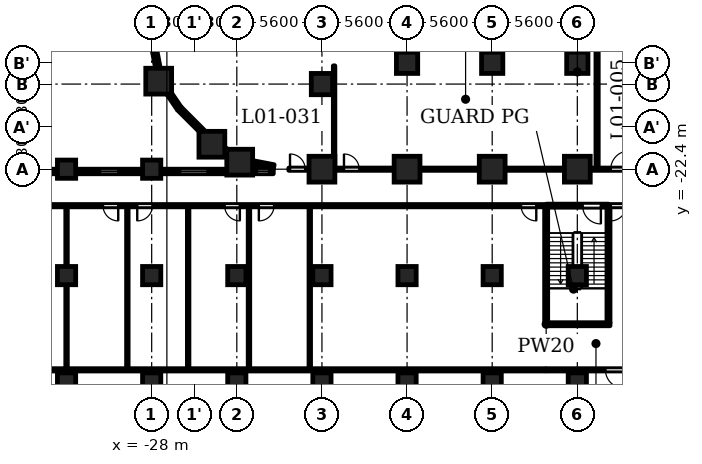
"""IFC4 building model, lengths in metres.
Left out: names, types, materials, properties, quantities, classifications, styles, units other than length and angle.
Written with IfcOpenShell. Run it as: python <this file> out.ifc"""

import sys

from ifc_helpers import new_model, si_unit, direction, frame, frame_2d, origin, origin_2d, place, context, subcontext, project, spatial, polyline, rectangle, circle, outline, extrude, element, fill, save


model = new_model("IFC4")
c1 = context("Model", 3, precision=1e-05, world=origin(), true_north=direction((0.0, 1.0)))
c2 = subcontext(c1, "Body", "Model", "MODEL_VIEW")
j1 = project(units=[si_unit("LENGTHUNIT", "METRE"), si_unit("PLANEANGLEUNIT", "RADIAN")], contexts=[c1])
p1 = place(None, origin())
s1 = spatial("IfcSite", under=j1, at=p1, CompositionType="ELEMENT")
p2 = place(p1, origin())
s2 = spatial("IfcBuilding", under=s1, at=p2, CompositionType="ELEMENT")
p3 = place(p2, frame((0.0, 0.0, 6.5)))
s3 = spatial("IfcBuildingStorey", under=s2, at=p3, CompositionType="ELEMENT", Elevation=6.5)
for number, where, z_axis, x_axis in (
    (1, (-22.209, -21.938, 0.0), (0.0, 0.0, 1.0), (1.0, 0.0, 0.0)),
    (2, (-16.8, -22.4, 0.0), (0.0, 0.0, 1.0), (1.0, 0.0, 0.0)),
    (3, (-11.2, -22.4, 0.0), (0.0, 0.0, 1.0), (1.0, 0.0, 0.0)),
    (4, (-5.6, -22.4, 0.0), (0.0, 0.0, 1.0), (1.0, 0.0, 0.0)),
    (5, (0.0, -22.4, 0.0), (0.0, 0.0, 1.0), (1.0, 0.0, 0.0)),
    (6, (-27.538, -16.609, 0.0), (0.0, 0.0, 1.0), (1.0, 0.0, 0.0)),
    (7, (-24.04, -20.76, 0.0), (0.0, 0.0, 1.0), (1.0, 0.0, 0.0)),
):
    element("IfcColumn", number, at=place(p3, frame(where, z_axis=z_axis, x_axis=x_axis)), inside=s3, PredefinedType="COLUMN", context=c2, shape_type="SweptSolid", body=[
        extrude(rectangle(XDim=1.7, YDim=1.7, at=origin_2d()), origin(), (0.0, 0.0, 1.0), 4.8),
    ])
for number, where, z_axis, x_axis in (
    (8, (-16.8, -16.8, 0.0), (0.0, 0.0, 1.0), (1.0, 0.0, 0.0)),
    (9, (-11.2, -15.4, 0.0), (0.0, 0.0, 1.0), (1.0, 0.0, 0.0)),
    (10, (-5.6, -15.4, 0.0), (0.0, 0.0, 1.0), (1.0, 0.0, 0.0)),
    (11, (0.0, -15.4, 0.0), (0.0, 0.0, 1.0), (1.0, 0.0, 0.0)),
):
    element("IfcColumn", number, at=place(p3, frame(where, z_axis=z_axis, x_axis=x_axis)), inside=s3, PredefinedType="COLUMN", context=c2, shape_type="SweptSolid", body=[
        extrude(rectangle(XDim=1.4, YDim=1.4, at=origin_2d()), origin(), (0.0, 0.0, 1.0), 4.8),
    ])
for number, where, z_axis, x_axis in (
    (12, (-33.6, -29.4, 0.0), (0.0, 0.0, 1.0), (1.0, 0.0, 0.0)),
    (13, (-28.0, -29.4, 0.0), (0.0, 0.0, 1.0), (1.0, 0.0, 0.0)),
    (14, (-22.4, -29.4, 0.0), (0.0, 0.0, 1.0), (1.0, 0.0, 0.0)),
    (15, (-16.8, -29.4, 0.0), (0.0, 0.0, 1.0), (1.0, 0.0, 0.0)),
    (16, (-11.2, -29.4, 0.0), (0.0, 0.0, 1.0), (1.0, 0.0, 0.0)),
    (17, (-5.6, -29.4, 0.0), (0.0, 0.0, 1.0), (1.0, 0.0, 0.0)),
    (18, (0.0, -29.4, 0.0), (0.0, 0.0, 1.0), (1.0, 0.0, 0.0)),
    (19, (-33.6, -36.4, 0.0), (0.0, 0.0, 1.0), (1.0, 0.0, 0.0)),
    (20, (-28.0, -36.4, 0.0), (0.0, 0.0, 1.0), (1.0, 0.0, 0.0)),
    (21, (-22.4, -36.4, 0.0), (0.0, 0.0, 1.0), (1.0, 0.0, 0.0)),
    (22, (-16.8, -36.4, 0.0), (0.0, 0.0, 1.0), (1.0, 0.0, 0.0)),
    (23, (-11.2, -36.4, 0.0), (0.0, 0.0, 1.0), (1.0, 0.0, 0.0)),
    (24, (-5.6, -36.4, 0.0), (0.0, 0.0, 1.0), (1.0, 0.0, 0.0)),
    (25, (0.0, -36.4, 0.0), (0.0, 0.0, 1.0), (1.0, 0.0, 0.0)),
    (26, (-33.6, -22.4, 0.0), (0.0, 0.0, 1.0), (1.0, 0.0, 0.0)),
    (27, (-28.0, -22.4, 0.0), (0.0, 0.0, 1.0), (1.0, 0.0, 0.0)),
):
    element("IfcColumn", number, at=place(p3, frame(where, z_axis=z_axis, x_axis=x_axis)), inside=s3, PredefinedType="COLUMN", context=c2, shape_type="SweptSolid", body=[
        extrude(circle(Radius=0.6, at=origin_2d()), origin(), (0.0, 0.0, 1.0), 4.8),
    ])
for number, where, z_axis, x_axis in (
    (28, (-27.853, -14.372, 0.0), (0.0, 0.0, 1.0), (0.187, -0.982, 0.0)),
    (29, (-26.969, -17.25, 0.0), (0.0, 0.0, 1.0), (0.562, -0.827, 0.0)),
):
    element("IfcWall", number, at=place(p3, frame(where, z_axis=z_axis, x_axis=x_axis)), inside=s3, PredefinedType="SOLIDWALL", context=c2, shape_type="SweptSolid", body=[
        extrude(rectangle(XDim=1.406, YDim=0.3, at=frame_2d((0.703, 0.0))), origin(), (0.0, 0.0, 1.0), 3.55),
    ])
p4 = place(p3, frame((-26.197, -18.391, 0.0), z_axis=(0.0, 0.0, 1.0), x_axis=(0.707054835785, -0.707158722772, 0.0)))
e30 = element("IfcWall", 30, at=p4, inside=s3, PredefinedType="SOLIDWALL", context=c2, shape_type="SweptSolid", body=[
    extrude(rectangle(XDim=2.35, YDim=0.3, at=frame_2d((1.175, 0.0))), origin(), (0.0, 0.0, 1.0), 3.55),
])
p5 = place(p3, frame((-23.244, -21.101, 0.0), z_axis=(0.0, 0.0, 1.0), x_axis=(0.827135885329, -0.562001981492, 0.0)))
e31 = element("IfcWall", 31, at=p5, inside=s3, PredefinedType="SOLIDWALL", context=c2, shape_type="SweptSolid", body=[
    extrude(rectangle(XDim=0.477, YDim=0.3, at=frame_2d((0.239, 0.0))), origin(), (0.0, 0.0, 1.0), 4.45),
])
p6 = place(p3, frame((-21.353, -21.989, 0.0), z_axis=(0.0, 0.0, 1.0), x_axis=(0.98229142023, -0.187359455971, 0.0)))
e32 = element("IfcWall", 32, at=p6, inside=s3, PredefinedType="SOLIDWALL", context=c2, shape_type="SweptSolid", body=[
    extrude(rectangle(XDim=1.406, YDim=0.3, at=frame_2d((0.703, 0.0))), origin(), (0.0, 0.0, 1.0), 3.55),
])
p7 = place(p3, frame((-20.0, -22.55, 0.0), z_axis=(0.0, 0.0, 1.0), x_axis=(-1.0, 0.0, 0.0)))
e33 = element("IfcWall", 33, at=p7, inside=s3, PredefinedType="SOLIDWALL", context=c2, shape_type="SweptSolid", body=[
    extrude(rectangle(XDim=1.359, YDim=0.3, at=frame_2d((0.679, 0.0))), origin(), (0.0, 0.0, 1.0), 3.55),
])
p8 = place(p7, frame((0.279, 0.0, 0.6)))
e34 = element("IfcOpeningElement", 34, at=p8, cuts=e33, PredefinedType="OPENING", context=c2, shape_type="SweptSolid", body=[
    extrude(rectangle(XDim=0.8, YDim=1.55, at=frame_2d((0.4, 0.775))), frame((0.0, 0.16, 0.0), z_axis=(0.0, -1.0, 0.0), x_axis=(1.0, 0.0, 0.0)), (0.0, 0.0, 1.0), 0.32),
])
p9 = place(p3, frame((-23.059, -22.55, 0.0), z_axis=(0.0, 0.0, 1.0), x_axis=(-1.0, 0.0, 0.0)))
e35 = element("IfcWall", 35, at=p9, inside=s3, PredefinedType="SOLIDWALL", context=c2, shape_type="SweptSolid", body=[
    extrude(rectangle(XDim=4.341, YDim=0.3, at=frame_2d((2.171, 0.0))), origin(), (0.0, 0.0, 1.0), 4.45),
])
p10 = place(p9, frame((1.271, 0.0, 0.9)))
e36 = element("IfcOpeningElement", 36, at=p10, cuts=e35, PredefinedType="OPENING", context=c2, shape_type="SweptSolid", body=[
    extrude(rectangle(XDim=1.8, YDim=1.25, at=frame_2d((0.9, 0.625))), frame((0.0, 0.16, 0.0), z_axis=(0.0, -1.0, 0.0), x_axis=(1.0, 0.0, 0.0)), (0.0, 0.0, 1.0), 0.32),
])
p11 = place(p3, frame((-28.6, -22.55, 0.0), z_axis=(0.0, 0.0, 1.0), x_axis=(-1.0, 0.0, 0.0)))
e37 = element("IfcWall", 37, at=p11, inside=s3, PredefinedType="SOLIDWALL", context=c2, shape_type="SweptSolid", body=[
    extrude(rectangle(XDim=4.4, YDim=0.3, at=frame_2d((2.2, 0.0))), origin(), (0.0, 0.0, 1.0), 4.45),
])
p12 = place(p11, frame((1.6, 0.0, 0.6)))
e38 = element("IfcOpeningElement", 38, at=p12, cuts=e37, PredefinedType="OPENING", context=c2, shape_type="SweptSolid", body=[
    extrude(rectangle(XDim=1.2, YDim=1.55, at=frame_2d((0.6, 0.775))), frame((0.0, 0.16, 0.0), z_axis=(0.0, -1.0, 0.0), x_axis=(1.0, 0.0, 0.0)), (0.0, 0.0, 1.0), 0.32),
])
p13 = place(p3, frame((-34.2, -22.55, 0.0), z_axis=(0.0, 0.0, 1.0), x_axis=(-1.0, 0.0, 0.0)))
e39 = element("IfcWall", 39, at=p13, inside=s3, PredefinedType="SOLIDWALL", context=c2, shape_type="SweptSolid", body=[
    extrude(rectangle(XDim=4.4, YDim=0.3, at=frame_2d((2.2, 0.0))), origin(), (0.0, 0.0, 1.0), 4.45),
])
p14 = place(p13, frame((1.3, 0.0, 0.9)))
e40 = element("IfcOpeningElement", 40, at=p14, cuts=e39, PredefinedType="OPENING", context=c2, shape_type="SweptSolid", body=[
    extrude(rectangle(XDim=1.8, YDim=1.25, at=frame_2d((0.9, 0.625))), frame((0.0, 0.16, 0.0), z_axis=(0.0, -1.0, 0.0), x_axis=(1.0, 0.0, 0.0)), (0.0, 0.0, 1.0), 0.32),
])
p15 = place(p3, frame((-44.48, -35.6, 0.0), z_axis=(0.0, 0.0, 1.0), x_axis=(1.0, 0.0, 0.0)))
e41 = element("IfcWall", 41, at=p15, inside=s3, PredefinedType="PARTITIONING", context=c2, shape_type="SweptSolid", body=[
    extrude(rectangle(XDim=42.38, YDim=0.15, at=frame_2d((21.19, 0.0))), origin(), (0.0, 0.0, 1.0), 4.45),
])
p16 = place(p3, frame((-2.05, -35.6, 0.0), z_axis=(0.0, 0.0, 1.0), x_axis=(1.0, 0.0, 0.0)))
e42 = element("IfcWall", 42, at=p16, inside=s3, PredefinedType="PARTITIONING", context=c2, shape_type="SweptSolid", body=[
    extrude(rectangle(XDim=5.6, YDim=0.15, at=frame_2d((2.8, 0.0))), origin(), (0.0, 0.0, 1.0), 4.45),
])
p17 = place(p16, frame((3.9, 0.0, 0.0)))
e43 = element("IfcOpeningElement", 43, at=p17, cuts=e42, PredefinedType="OPENING", context=c2, shape_type="SweptSolid", body=[
    extrude(rectangle(XDim=1.2, YDim=2.1, at=frame_2d((0.6, 1.05))), frame((0.0, 0.085, 0.0), z_axis=(0.0, -1.0, 0.0), x_axis=(1.0, 0.0, 0.0)), (0.0, 0.0, 1.0), 0.17),
])
p18 = place(p3, frame((-2.05, -32.6, 0.0), z_axis=(0.0, 0.0, 1.0), x_axis=(1.0, 0.0, 0.0)))
e44 = element("IfcWall", 44, at=p18, inside=s3, PredefinedType="SHEAR", context=c2, shape_type="SweptSolid", body=[
    extrude(rectangle(XDim=4.2, YDim=0.2, at=frame_2d((2.1, 0.0))), origin(), (0.0, 0.0, 1.0), 4.45),
])
p19 = place(p3, frame((-37.0, -24.8, 0.0), z_axis=(0.0, 0.0, 1.0), x_axis=(1.0, 0.0, 0.0)))
e45 = element("IfcWall", 45, at=p19, inside=s3, PredefinedType="PARTITIONING", context=c2, shape_type="SweptSolid", body=[
    extrude(rectangle(XDim=34.9, YDim=0.15, at=frame_2d((17.45, 0.0))), origin(), (0.0, 0.0, 1.0), 4.45),
])
p20 = place(p19, frame((0.65, 0.0, 0.0)))
e46 = element("IfcOpeningElement", 46, at=p20, cuts=e45, PredefinedType="OPENING", context=c2, shape_type="SweptSolid", body=[
    extrude(rectangle(XDim=1.0, YDim=2.1, at=frame_2d((0.5, 1.05))), frame((0.0, 0.085, 0.0), z_axis=(0.0, -1.0, 0.0), x_axis=(1.0, 0.0, 0.0)), (0.0, 0.0, 1.0), 0.17),
])
p21 = place(p19, frame((5.8, 0.0, 0.0)))
e47 = element("IfcOpeningElement", 47, at=p21, cuts=e45, PredefinedType="OPENING", context=c2, shape_type="SweptSolid", body=[
    extrude(rectangle(XDim=1.0, YDim=2.1, at=frame_2d((0.5, 1.05))), frame((0.0, 0.085, 0.0), z_axis=(0.0, -1.0, 0.0), x_axis=(1.0, 0.0, 0.0)), (0.0, 0.0, 1.0), 0.17),
])
p22 = place(p19, frame((8.05, 0.0, 0.0)))
e48 = element("IfcOpeningElement", 48, at=p22, cuts=e45, PredefinedType="OPENING", context=c2, shape_type="SweptSolid", body=[
    extrude(rectangle(XDim=1.0, YDim=2.1, at=frame_2d((0.5, 1.05))), frame((0.0, 0.085, 0.0), z_axis=(0.0, -1.0, 0.0), x_axis=(1.0, 0.0, 0.0)), (0.0, 0.0, 1.0), 0.17),
])
p23 = place(p19, frame((13.8, 0.0, 0.0)))
e49 = element("IfcOpeningElement", 49, at=p23, cuts=e45, PredefinedType="OPENING", context=c2, shape_type="SweptSolid", body=[
    extrude(rectangle(XDim=1.0, YDim=2.1, at=frame_2d((0.5, 1.05))), frame((0.0, 0.085, 0.0), z_axis=(0.0, -1.0, 0.0), x_axis=(1.0, 0.0, 0.0)), (0.0, 0.0, 1.0), 0.17),
])
p24 = place(p19, frame((16.05, 0.0, 0.0)))
e50 = element("IfcOpeningElement", 50, at=p24, cuts=e45, PredefinedType="OPENING", context=c2, shape_type="SweptSolid", body=[
    extrude(rectangle(XDim=1.0, YDim=2.1, at=frame_2d((0.5, 1.05))), frame((0.0, 0.085, 0.0), z_axis=(0.0, -1.0, 0.0), x_axis=(1.0, 0.0, 0.0)), (0.0, 0.0, 1.0), 0.17),
])
p25 = place(p19, frame((33.3, 0.0, 0.0)))
e51 = element("IfcOpeningElement", 51, at=p25, cuts=e45, PredefinedType="OPENING", context=c2, shape_type="SweptSolid", body=[
    extrude(rectangle(XDim=1.0, YDim=2.1, at=frame_2d((0.5, 1.05))), frame((0.0, 0.085, 0.0), z_axis=(0.0, -1.0, 0.0), x_axis=(1.0, 0.0, 0.0)), (0.0, 0.0, 1.0), 0.17),
])
p26 = place(p3, frame((2.05, -24.8, 0.0), z_axis=(0.0, 0.0, 1.0), x_axis=(1.0, 0.0, 0.0)))
e52 = element("IfcWall", 52, at=p26, inside=s3, PredefinedType="PARTITIONING", context=c2, shape_type="SweptSolid", body=[
    extrude(rectangle(XDim=1.5, YDim=0.15, at=frame_2d((0.75, 0.0))), origin(), (0.0, 0.0, 1.0), 4.45),
])
p27 = place(p26, frame((0.15, 0.0, 0.0)))
e53 = element("IfcOpeningElement", 53, at=p27, cuts=e52, PredefinedType="OPENING", context=c2, shape_type="SweptSolid", body=[
    extrude(rectangle(XDim=1.0, YDim=2.1, at=frame_2d((0.5, 1.05))), frame((0.0, 0.085, 0.0), z_axis=(0.0, -1.0, 0.0), x_axis=(1.0, 0.0, 0.0)), (0.0, 0.0, 1.0), 0.17),
])
p28 = place(p3, frame((-2.05, -24.8, 0.0), z_axis=(0.0, 0.0, 1.0), x_axis=(1.0, 0.0, 0.0)))
e54 = element("IfcWall", 54, at=p28, inside=s3, PredefinedType="SHEAR", context=c2, shape_type="SweptSolid", body=[
    extrude(rectangle(XDim=4.1, YDim=0.2, at=frame_2d((2.05, 0.0))), origin(), (0.0, 0.0, 1.0), 4.45),
])
p29 = place(p28, frame((2.4, 0.0, 0.0)))
e55 = element("IfcOpeningElement", 55, at=p29, cuts=e54, PredefinedType="OPENING", context=c2, shape_type="SweptSolid", body=[
    extrude(rectangle(XDim=1.2, YDim=2.1, at=frame_2d((0.6, 1.05))), frame((0.0, 0.11, 0.0), z_axis=(0.0, -1.0, 0.0), x_axis=(1.0, 0.0, 0.0)), (0.0, 0.0, 1.0), 0.22),
])
p30 = place(p3, frame((-18.98, -22.4, 0.0), z_axis=(0.0, 0.0, 1.0), x_axis=(1.0, 0.0, 0.0)))
e56 = element("IfcWall", 56, at=p30, inside=s3, PredefinedType="PARTITIONING", context=c2, shape_type="SweptSolid", body=[
    extrude(rectangle(XDim=38.211, YDim=0.15, at=frame_2d((19.105, 0.0))), origin(), (0.0, 0.0, 1.0), 3.55),
])
p31 = place(p30, frame((21.18, 0.0, 0.0)))
e57 = element("IfcOpeningElement", 57, at=p31, cuts=e56, PredefinedType="OPENING", context=c2, shape_type="SweptSolid", body=[
    extrude(rectangle(XDim=1.2, YDim=2.1, at=frame_2d((0.6, 1.05))), frame((0.0, 0.085, 0.0), z_axis=(0.0, -1.0, 0.0), x_axis=(1.0, 0.0, 0.0)), (0.0, 0.0, 1.0), 0.17),
])
p32 = place(p30, frame((0.08, 0.0, 0.0)))
e58 = element("IfcOpeningElement", 58, at=p32, cuts=e56, PredefinedType="OPENING", context=c2, shape_type="SweptSolid", body=[
    extrude(rectangle(XDim=1.0, YDim=2.1, at=frame_2d((0.5, 1.05))), frame((0.0, 0.085, 0.0), z_axis=(0.0, -1.0, 0.0), x_axis=(1.0, 0.0, 0.0)), (0.0, 0.0, 1.0), 0.17),
])
p33 = place(p30, frame((3.63, 0.0, 0.0)))
e59 = element("IfcOpeningElement", 59, at=p33, cuts=e56, PredefinedType="OPENING", context=c2, shape_type="SweptSolid", body=[
    extrude(rectangle(XDim=1.0, YDim=2.1, at=frame_2d((0.5, 1.05))), frame((0.0, 0.085, 0.0), z_axis=(0.0, -1.0, 0.0), x_axis=(1.0, 0.0, 0.0)), (0.0, 0.0, 1.0), 0.17),
])
p34 = place(p30, frame((27.93, 0.0, 0.0)))
e60 = element("IfcOpeningElement", 60, at=p34, cuts=e56, PredefinedType="OPENING", context=c2, shape_type="SweptSolid", body=[
    extrude(rectangle(XDim=0.9, YDim=2.1, at=frame_2d((0.45, 1.05))), frame((0.0, 0.085, 0.0), z_axis=(0.0, -1.0, 0.0), x_axis=(1.0, 0.0, 0.0)), (0.0, 0.0, 1.0), 0.17),
])
p35 = place(p30, frame((31.18, 0.0, 0.0)))
e61 = element("IfcOpeningElement", 61, at=p35, cuts=e56, PredefinedType="OPENING", context=c2, shape_type="SweptSolid", body=[
    extrude(rectangle(XDim=0.9, YDim=2.1, at=frame_2d((0.45, 1.05))), frame((0.0, 0.085, 0.0), z_axis=(0.0, -1.0, 0.0), x_axis=(1.0, 0.0, 0.0)), (0.0, 0.0, 1.0), 0.17),
])
p36 = place(p30, frame((33.88, 0.0, 0.0)))
e62 = element("IfcOpeningElement", 62, at=p36, cuts=e56, PredefinedType="OPENING", context=c2, shape_type="SweptSolid", body=[
    extrude(rectangle(XDim=0.9, YDim=2.1, at=frame_2d((0.45, 1.05))), frame((0.0, 0.085, 0.0), z_axis=(0.0, -1.0, 0.0), x_axis=(1.0, 0.0, 0.0)), (0.0, 0.0, 1.0), 0.17),
])
p37 = place(p30, frame((37.231, 0.0, 0.0)))
e63 = element("IfcOpeningElement", 63, at=p37, cuts=e56, PredefinedType="OPENING", context=c2, shape_type="SweptSolid", body=[
    extrude(rectangle(XDim=0.9, YDim=2.1, at=frame_2d((0.45, 1.05))), frame((0.0, 0.085, 0.0), z_axis=(0.0, -1.0, 0.0), x_axis=(1.0, 0.0, 0.0)), (0.0, 0.0, 1.0), 0.17),
])
for number, where, z_axis, x_axis in (
    (64, (-33.6, -35.525, 0.0), (0.0, 0.0, 1.0), (0.0, 1.0, 0.0)),
    (65, (-29.6, -35.525, 0.0), (0.0, 0.0, 1.0), (0.0, 1.0, 0.0)),
    (66, (-25.6, -35.525, 0.0), (0.0, 0.0, 1.0), (0.0, 1.0, 0.0)),
    (67, (-21.6, -35.525, 0.0), (0.0, 0.0, 1.0), (0.0, 1.0, 0.0)),
    (68, (-17.6, -35.525, 0.0), (0.0, 0.0, 1.0), (0.0, 1.0, 0.0)),
):
    element("IfcWall", number, at=place(p3, frame(where, z_axis=z_axis, x_axis=x_axis)), inside=s3, PredefinedType="PARTITIONING", context=c2, shape_type="SweptSolid", body=[
        extrude(rectangle(XDim=10.65, YDim=0.1, at=frame_2d((5.325, 0.0))), origin(), (0.0, 0.0, 1.0), 4.45),
    ])
p38 = place(p3, frame((-16.0, -22.325, 0.0), z_axis=(0.0, 0.0, 1.0), x_axis=(0.0, 1.0, 0.0)))
e69 = element("IfcWall", 69, at=p38, inside=s3, PredefinedType="PARTITIONING", context=c2, shape_type="SweptSolid", body=[
    extrude(rectangle(XDim=6.725, YDim=0.1, at=frame_2d((3.362, 0.0))), origin(), (0.0, 0.0, 1.0), 4.45),
])
p39 = place(p3, frame((1.3, -22.325, 0.0), z_axis=(0.0, 0.0, 1.0), x_axis=(0.0, 1.0, 0.0)))
e70 = element("IfcWall", 70, at=p39, inside=s3, PredefinedType="PARTITIONING", context=c2, shape_type="SweptSolid", body=[
    extrude(rectangle(XDim=9.05, YDim=0.15, at=frame_2d((4.525, 0.0))), origin(), (0.0, 0.0, 1.0), 4.45),
])
p40 = place(p3, frame((2.05, -32.5, 0.0), z_axis=(0.0, 0.0, 1.0), x_axis=(0.0, 1.0, 0.0)))
e71 = element("IfcWall", 71, at=p40, inside=s3, PredefinedType="SHEAR", context=c2, shape_type="SweptSolid", body=[
    extrude(rectangle(XDim=7.625, YDim=0.2, at=frame_2d((3.812, 0.0))), origin(), (0.0, 0.0, 1.0), 4.45),
])
p41 = place(p3, frame((-2.05, -32.5, 0.0), z_axis=(0.0, 0.0, 1.0), x_axis=(0.0, 1.0, 0.0)))
e72 = element("IfcWall", 72, at=p41, inside=s3, PredefinedType="SHEAR", context=c2, shape_type="SweptSolid", body=[
    extrude(rectangle(XDim=7.6, YDim=0.2, at=frame_2d((3.8, 0.0))), origin(), (0.0, 0.0, 1.0), 4.45),
])
p42 = place(p3, origin())
e73 = element("IfcWall", 73, at=p42, inside=s3, PredefinedType="SOLIDWALL", context=c2, shape_type="SweptSolid", body=[
    extrude(outline(polyline([(-20.0, -22.7), (-19.0, -22.7), (-19.0, -22.285), (-19.944, -22.105), (-20.0, -22.4), (-20.0, -22.7)])), origin(), (0.0, 0.0, 1.0), 3.55),
])
p43 = place(p31, origin())
e74 = element("IfcDoor", 74, at=p43, inside=s3, OperationType="SINGLE_SWING_LEFT", PredefinedType="DOOR", context=c2, shape_type="SweptSolid", body=[
    extrude(rectangle(XDim=1.2, YDim=2.1, at=frame_2d((0.6, 1.05))), frame((0.0, 0.025, 0.0), z_axis=(0.0, -1.0, 0.0), x_axis=(1.0, 0.0, 0.0)), (0.0, 0.0, 1.0), 0.05),
])
fill(e57, e74)
p44 = place(p29, origin())
e75 = element("IfcDoor", 75, at=p44, inside=s3, OperationType="SINGLE_SWING_RIGHT", PredefinedType="DOOR", context=c2, shape_type="SweptSolid", body=[
    extrude(rectangle(XDim=1.2, YDim=2.1, at=frame_2d((0.6, 1.05))), frame((0.0, 0.025, 0.0), z_axis=(0.0, -1.0, 0.0), x_axis=(1.0, 0.0, 0.0)), (0.0, 0.0, 1.0), 0.05),
])
fill(e55, e75)
p45 = place(p27, origin())
e76 = element("IfcDoor", 76, at=p45, inside=s3, OperationType="SINGLE_SWING_LEFT", PredefinedType="DOOR", context=c2, shape_type="SweptSolid", body=[
    extrude(rectangle(XDim=1.0, YDim=2.1, at=frame_2d((0.5, 1.05))), frame((0.0, 0.025, 0.0), z_axis=(0.0, -1.0, 0.0), x_axis=(1.0, 0.0, 0.0)), (0.0, 0.0, 1.0), 0.05),
])
fill(e53, e76)
p46 = place(p17, origin())
e77 = element("IfcDoor", 77, at=p46, inside=s3, OperationType="SINGLE_SWING_RIGHT", PredefinedType="DOOR", context=c2, shape_type="SweptSolid", body=[
    extrude(rectangle(XDim=1.2, YDim=2.1, at=frame_2d((0.6, 1.05))), frame((0.0, 0.025, 0.0), z_axis=(0.0, -1.0, 0.0), x_axis=(1.0, 0.0, 0.0)), (0.0, 0.0, 1.0), 0.05),
])
fill(e43, e77)
p47 = place(p21, origin())
e78 = element("IfcDoor", 78, at=p47, inside=s3, OperationType="SINGLE_SWING_RIGHT", PredefinedType="DOOR", context=c2, shape_type="SweptSolid", body=[
    extrude(rectangle(XDim=1.0, YDim=2.1, at=frame_2d((0.5, 1.05))), frame((0.0, 0.025, 0.0), z_axis=(0.0, -1.0, 0.0), x_axis=(1.0, 0.0, 0.0)), (0.0, 0.0, 1.0), 0.05),
])
fill(e47, e78)
p48 = place(p22, origin())
e79 = element("IfcDoor", 79, at=p48, inside=s3, OperationType="SINGLE_SWING_LEFT", PredefinedType="DOOR", context=c2, shape_type="SweptSolid", body=[
    extrude(rectangle(XDim=1.0, YDim=2.1, at=frame_2d((0.5, 1.05))), frame((0.0, 0.025, 0.0), z_axis=(0.0, -1.0, 0.0), x_axis=(1.0, 0.0, 0.0)), (0.0, 0.0, 1.0), 0.05),
])
fill(e48, e79)
p49 = place(p23, origin())
e80 = element("IfcDoor", 80, at=p49, inside=s3, OperationType="SINGLE_SWING_RIGHT", PredefinedType="DOOR", context=c2, shape_type="SweptSolid", body=[
    extrude(rectangle(XDim=1.0, YDim=2.1, at=frame_2d((0.5, 1.05))), frame((0.0, 0.025, 0.0), z_axis=(0.0, -1.0, 0.0), x_axis=(1.0, 0.0, 0.0)), (0.0, 0.0, 1.0), 0.05),
])
fill(e49, e80)
p50 = place(p24, origin())
e81 = element("IfcDoor", 81, at=p50, inside=s3, OperationType="SINGLE_SWING_LEFT", PredefinedType="DOOR", context=c2, shape_type="SweptSolid", body=[
    extrude(rectangle(XDim=1.0, YDim=2.1, at=frame_2d((0.5, 1.05))), frame((0.0, 0.025, 0.0), z_axis=(0.0, -1.0, 0.0), x_axis=(1.0, 0.0, 0.0)), (0.0, 0.0, 1.0), 0.05),
])
fill(e50, e81)
p51 = place(p25, origin())
e82 = element("IfcDoor", 82, at=p51, inside=s3, OperationType="SINGLE_SWING_RIGHT", PredefinedType="DOOR", context=c2, shape_type="SweptSolid", body=[
    extrude(rectangle(XDim=1.0, YDim=2.1, at=frame_2d((0.5, 1.05))), frame((0.0, 0.025, 0.0), z_axis=(0.0, -1.0, 0.0), x_axis=(1.0, 0.0, 0.0)), (0.0, 0.0, 1.0), 0.05),
])
fill(e51, e82)
p52 = place(p32, origin())
e83 = element("IfcDoor", 83, at=p52, inside=s3, OperationType="SINGLE_SWING_RIGHT", PredefinedType="DOOR", context=c2, shape_type="SweptSolid", body=[
    extrude(rectangle(XDim=1.0, YDim=2.1, at=frame_2d((0.5, 1.05))), frame((0.0, 0.025, 0.0), z_axis=(0.0, -1.0, 0.0), x_axis=(1.0, 0.0, 0.0)), (0.0, 0.0, 1.0), 0.05),
])
fill(e58, e83)
p53 = place(p33, origin())
e84 = element("IfcDoor", 84, at=p53, inside=s3, OperationType="SINGLE_SWING_RIGHT", PredefinedType="DOOR", context=c2, shape_type="SweptSolid", body=[
    extrude(rectangle(XDim=1.0, YDim=2.1, at=frame_2d((0.5, 1.05))), frame((0.0, 0.025, 0.0), z_axis=(0.0, -1.0, 0.0), x_axis=(1.0, 0.0, 0.0)), (0.0, 0.0, 1.0), 0.05),
])
fill(e59, e84)
p54 = place(p8, origin())
e85 = element("IfcWindow", 85, at=p54, inside=s3, PartitioningType="SINGLE_PANEL", PredefinedType="WINDOW", context=c2, shape_type="SweptSolid", body=[
    extrude(rectangle(XDim=0.8, YDim=1.55, at=frame_2d((0.4, 0.775))), frame((0.0, 0.03, 0.0), z_axis=(0.0, -1.0, 0.0), x_axis=(1.0, 0.0, 0.0)), (0.0, 0.0, 1.0), 0.06),
])
fill(e34, e85)
p55 = place(p10, origin())
e86 = element("IfcWindow", 86, at=p55, inside=s3, PartitioningType="SINGLE_PANEL", PredefinedType="WINDOW", context=c2, shape_type="SweptSolid", body=[
    extrude(rectangle(XDim=1.8, YDim=1.25, at=frame_2d((0.9, 0.625))), frame((0.0, 0.03, 0.0), z_axis=(0.0, -1.0, 0.0), x_axis=(1.0, 0.0, 0.0)), (0.0, 0.0, 1.0), 0.06),
])
fill(e36, e86)
p56 = place(p12, origin())
e87 = element("IfcWindow", 87, at=p56, inside=s3, PartitioningType="SINGLE_PANEL", PredefinedType="WINDOW", context=c2, shape_type="SweptSolid", body=[
    extrude(rectangle(XDim=1.2, YDim=1.55, at=frame_2d((0.6, 0.775))), frame((0.0, 0.03, 0.0), z_axis=(0.0, -1.0, 0.0), x_axis=(1.0, 0.0, 0.0)), (0.0, 0.0, 1.0), 0.06),
])
fill(e38, e87)
save(model, sys.argv[1])
